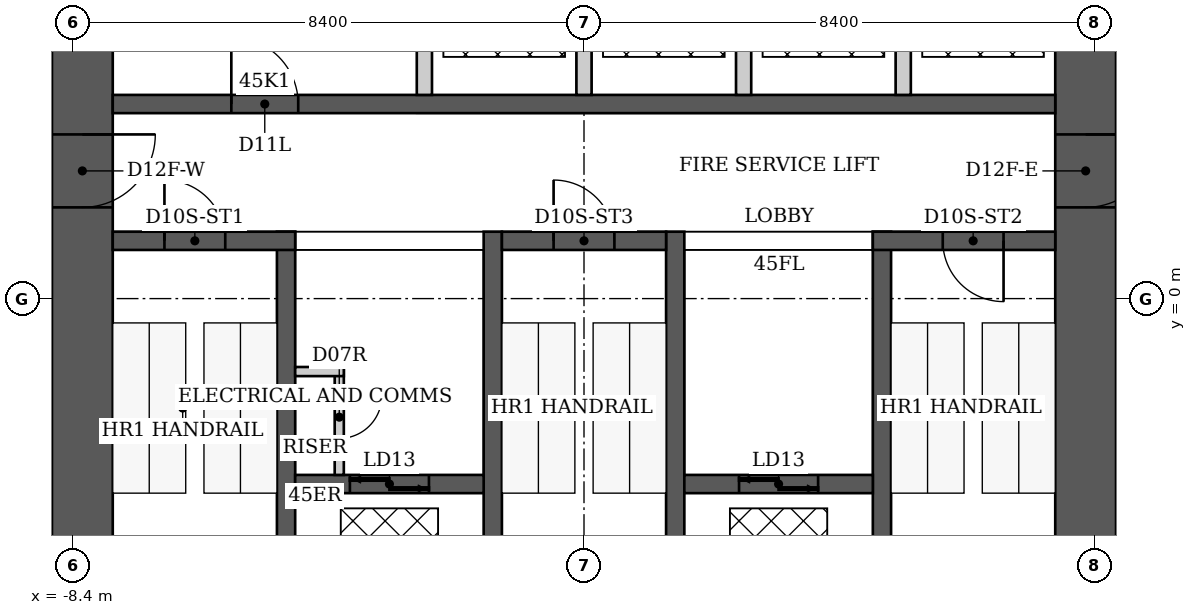
"""IFC4 building model, lengths in metres.
Left out: names, types, materials, properties, quantities, classifications, styles, units other than length and angle.
Written with IfcOpenShell. Run it as: python <this file> out.ifc"""

import sys

from ifc_helpers import new_model, si_unit, direction, frame, frame_2d, origin, place, context, subcontext, project, spatial, rectangle, extrude, element, fill, save


model = new_model("IFC4")
c1 = context("Model", 3, precision=1e-05, world=origin(), true_north=direction((0.0, 1.0)))
c2 = subcontext(c1, "Body", "Model", "MODEL_VIEW")
j1 = project(units=[si_unit("LENGTHUNIT", "METRE"), si_unit("PLANEANGLEUNIT", "RADIAN")], contexts=[c1])
p1 = place(None, origin())
s1 = spatial("IfcSite", under=j1, at=p1, CompositionType="ELEMENT")
p2 = place(p1, origin())
s2 = spatial("IfcBuilding", under=s1, at=p2, CompositionType="ELEMENT")
p3 = place(p2, frame((0.0, 0.0, 183.2)))
s3 = spatial("IfcBuildingStorey", under=s2, at=p3, CompositionType="ELEMENT", Elevation=183.2)
p4 = place(p3, frame((-8.25, -6.1, 0.0), z_axis=(0.0, 0.0, 1.0), x_axis=(0.0, 1.0, 0.0)))
e1 = element("IfcWall", 1, at=p4, inside=s3, PredefinedType="SHEAR", context=c2, shape_type="SweptSolid", body=[
    extrude(rectangle(XDim=12.2, YDim=1.0, at=frame_2d((6.1, 0.0))), origin(), (0.0, 0.0, 1.0), 3.8),
])
p5 = place(p4, frame((7.6, 0.0, 0.0)))
e2 = element("IfcOpeningElement", 2, at=p5, cuts=e1, PredefinedType="OPENING", context=c2, shape_type="SweptSolid", body=[
    extrude(rectangle(XDim=1.2, YDim=2.2, at=frame_2d((0.6, 1.1))), frame((0.0, 0.5, 0.0), z_axis=(0.0, -1.0, 0.0), x_axis=(1.0, 0.0, 0.0)), (0.0, 0.0, 1.0), 1.0),
])
p6 = place(p3, frame((8.25, -6.1, 0.0), z_axis=(0.0, 0.0, 1.0), x_axis=(0.0, 1.0, 0.0)))
e3 = element("IfcWall", 3, at=p6, inside=s3, PredefinedType="SHEAR", context=c2, shape_type="SweptSolid", body=[
    extrude(rectangle(XDim=12.2, YDim=1.0, at=frame_2d((6.1, 0.0))), origin(), (0.0, 0.0, 1.0), 3.8),
])
p7 = place(p6, frame((7.6, 0.0, 0.0)))
e4 = element("IfcOpeningElement", 4, at=p7, cuts=e3, PredefinedType="OPENING", context=c2, shape_type="SweptSolid", body=[
    extrude(rectangle(XDim=1.2, YDim=2.2, at=frame_2d((0.6, 1.1))), frame((0.0, 0.5, 0.0), z_axis=(0.0, -1.0, 0.0), x_axis=(1.0, 0.0, 0.0)), (0.0, 0.0, 1.0), 1.0),
])
for number, where, z_axis, x_axis in (
    (5, (-4.9, -6.1, 0.0), (0.0, 0.0, 1.0), (0.0, 1.0, 0.0)),
    (6, (-1.5, -6.1, 0.0), (0.0, 0.0, 1.0), (0.0, 1.0, 0.0)),
    (7, (1.5, -6.1, 0.0), (0.0, 0.0, 1.0), (0.0, 1.0, 0.0)),
    (8, (4.9, -6.1, 0.0), (0.0, 0.0, 1.0), (0.0, 1.0, 0.0)),
):
    element("IfcWall", number, at=place(p3, frame(where, z_axis=z_axis, x_axis=x_axis)), inside=s3, PredefinedType="SHEAR", context=c2, shape_type="SweptSolid", body=[
        extrude(rectangle(XDim=7.2, YDim=0.3, at=frame_2d((3.6, 0.0))), origin(), (0.0, 0.0, 1.0), 3.8),
    ])
p8 = place(p3, frame((-7.75, 0.95, 0.0), z_axis=(0.0, 0.0, 1.0), x_axis=(1.0, 0.0, 0.0)))
e9 = element("IfcWall", 9, at=p8, inside=s3, PredefinedType="SHEAR", context=c2, shape_type="SweptSolid", body=[
    extrude(rectangle(XDim=3.0, YDim=0.3, at=frame_2d((1.5, 0.0))), origin(), (0.0, 0.0, 1.0), 3.8),
])
p9 = place(p8, frame((0.85, 0.0, 0.0)))
e10 = element("IfcOpeningElement", 10, at=p9, cuts=e9, PredefinedType="OPENING", context=c2, shape_type="SweptSolid", body=[
    extrude(rectangle(XDim=1.0, YDim=2.2, at=frame_2d((0.5, 1.1))), frame((0.0, 0.15, 0.0), z_axis=(0.0, -1.0, 0.0), x_axis=(1.0, 0.0, 0.0)), (0.0, 0.0, 1.0), 0.3),
])
p10 = place(p3, frame((-1.35, 0.95, 0.0), z_axis=(0.0, 0.0, 1.0), x_axis=(1.0, 0.0, 0.0)))
e11 = element("IfcWall", 11, at=p10, inside=s3, PredefinedType="SHEAR", context=c2, shape_type="SweptSolid", body=[
    extrude(rectangle(XDim=2.7, YDim=0.3, at=frame_2d((1.35, 0.0))), origin(), (0.0, 0.0, 1.0), 3.8),
])
p11 = place(p10, frame((0.85, 0.0, 0.0)))
e12 = element("IfcOpeningElement", 12, at=p11, cuts=e11, PredefinedType="OPENING", context=c2, shape_type="SweptSolid", body=[
    extrude(rectangle(XDim=1.0, YDim=2.2, at=frame_2d((0.5, 1.1))), frame((0.0, 0.15, 0.0), z_axis=(0.0, -1.0, 0.0), x_axis=(1.0, 0.0, 0.0)), (0.0, 0.0, 1.0), 0.3),
])
p12 = place(p3, frame((4.75, 0.95, 0.0), z_axis=(0.0, 0.0, 1.0), x_axis=(1.0, 0.0, 0.0)))
e13 = element("IfcWall", 13, at=p12, inside=s3, PredefinedType="SHEAR", context=c2, shape_type="SweptSolid", body=[
    extrude(rectangle(XDim=3.0, YDim=0.3, at=frame_2d((1.5, 0.0))), origin(), (0.0, 0.0, 1.0), 3.8),
])
p13 = place(p12, frame((1.15, 0.0, 0.0)))
e14 = element("IfcOpeningElement", 14, at=p13, cuts=e13, PredefinedType="OPENING", context=c2, shape_type="SweptSolid", body=[
    extrude(rectangle(XDim=1.0, YDim=2.2, at=frame_2d((0.5, 1.1))), frame((0.0, 0.15, 0.0), z_axis=(0.0, -1.0, 0.0), x_axis=(1.0, 0.0, 0.0)), (0.0, 0.0, 1.0), 0.3),
])
p14 = place(p3, frame((-4.75, -3.05, 0.0), z_axis=(0.0, 0.0, 1.0), x_axis=(1.0, 0.0, 0.0)))
e15 = element("IfcWall", 15, at=p14, inside=s3, PredefinedType="SHEAR", context=c2, shape_type="SweptSolid", body=[
    extrude(rectangle(XDim=3.1, YDim=0.3, at=frame_2d((1.55, 0.0))), origin(), (0.0, 0.0, 1.0), 3.8),
])
p15 = place(p14, frame((0.9, 0.0, 0.0)))
e16 = element("IfcOpeningElement", 16, at=p15, cuts=e15, PredefinedType="OPENING", context=c2, shape_type="SweptSolid", body=[
    extrude(rectangle(XDim=1.3, YDim=2.1, at=frame_2d((0.65, 1.05))), frame((0.0, 0.15, 0.0), z_axis=(0.0, -1.0, 0.0), x_axis=(1.0, 0.0, 0.0)), (0.0, 0.0, 1.0), 0.3),
])
p16 = place(p3, frame((1.65, -3.05, 0.0), z_axis=(0.0, 0.0, 1.0), x_axis=(1.0, 0.0, 0.0)))
e17 = element("IfcWall", 17, at=p16, inside=s3, PredefinedType="SHEAR", context=c2, shape_type="SweptSolid", body=[
    extrude(rectangle(XDim=3.1, YDim=0.3, at=frame_2d((1.55, 0.0))), origin(), (0.0, 0.0, 1.0), 3.8),
])
p17 = place(p16, frame((0.9, 0.0, 0.0)))
e18 = element("IfcOpeningElement", 18, at=p17, cuts=e17, PredefinedType="OPENING", context=c2, shape_type="SweptSolid", body=[
    extrude(rectangle(XDim=1.3, YDim=2.1, at=frame_2d((0.65, 1.05))), frame((0.0, 0.15, 0.0), z_axis=(0.0, -1.0, 0.0), x_axis=(1.0, 0.0, 0.0)), (0.0, 0.0, 1.0), 0.3),
])
p18 = place(p3, frame((-7.75, 3.2, 0.0), z_axis=(0.0, 0.0, 1.0), x_axis=(1.0, 0.0, 0.0)))
e19 = element("IfcWall", 19, at=p18, inside=s3, PredefinedType="SHEAR", context=c2, shape_type="SweptSolid", body=[
    extrude(rectangle(XDim=15.5, YDim=0.3, at=frame_2d((7.75, 0.0))), origin(), (0.0, 0.0, 1.0), 3.8),
])
p19 = place(p18, frame((1.95, 0.0, 0.0)))
e20 = element("IfcOpeningElement", 20, at=p19, cuts=e19, PredefinedType="OPENING", context=c2, shape_type="SweptSolid", body=[
    extrude(rectangle(XDim=1.1, YDim=2.2, at=frame_2d((0.55, 1.1))), frame((0.0, 0.15, 0.0), z_axis=(0.0, -1.0, 0.0), x_axis=(1.0, 0.0, 0.0)), (0.0, 0.0, 1.0), 0.3),
])
for number, where, z_axis, x_axis in (
    (21, (-2.625, 3.35, 0.0), (0.0, 0.0, 1.0), (0.0, 1.0, 0.0)),
    (22, (0.0, 3.35, 0.0), (0.0, 0.0, 1.0), (0.0, 1.0, 0.0)),
    (23, (2.625, 3.35, 0.0), (0.0, 0.0, 1.0), (0.0, 1.0, 0.0)),
    (24, (5.25, 3.35, 0.0), (0.0, 0.0, 1.0), (0.0, 1.0, 0.0)),
):
    element("IfcWall", number, at=place(p3, frame(where, z_axis=z_axis, x_axis=x_axis)), inside=s3, PredefinedType="PARTITIONING", context=c2, shape_type="SweptSolid", body=[
        extrude(rectangle(XDim=2.75, YDim=0.25, at=frame_2d((1.375, 0.0))), origin(), (0.0, 0.0, 1.0), 3.8),
    ])
p20 = place(p3, frame((-4.025, -2.9, 0.0), z_axis=(0.0, 0.0, 1.0), x_axis=(0.0, 1.0, 0.0)))
e25 = element("IfcWall", 25, at=p20, inside=s3, PredefinedType="PARTITIONING", context=c2, shape_type="SweptSolid", body=[
    extrude(rectangle(XDim=1.775, YDim=0.15, at=frame_2d((0.887, 0.0))), origin(), (0.0, 0.0, 1.0), 3.64),
])
p21 = place(p20, frame((0.6, 0.0, 0.0)))
e26 = element("IfcOpeningElement", 26, at=p21, cuts=e25, PredefinedType="OPENING", context=c2, shape_type="SweptSolid", body=[
    extrude(rectangle(XDim=0.7, YDim=2.1, at=frame_2d((0.35, 1.05))), frame((0.0, 0.075, 0.0), z_axis=(0.0, -1.0, 0.0), x_axis=(1.0, 0.0, 0.0)), (0.0, 0.0, 1.0), 0.15),
])
p22 = place(p3, frame((-4.75, -1.2, 0.0), z_axis=(0.0, 0.0, 1.0), x_axis=(1.0, 0.0, 0.0)))
e27 = element("IfcWall", 27, at=p22, inside=s3, PredefinedType="PARTITIONING", context=c2, shape_type="SweptSolid", body=[
    extrude(rectangle(XDim=0.8, YDim=0.15, at=frame_2d((0.4, 0.0))), origin(), (0.0, 0.0, 1.0), 3.64),
])
p23 = place(p9, origin())
e28 = element("IfcDoor", 28, at=p23, inside=s3, OperationType="SINGLE_SWING_LEFT", PredefinedType="DOOR", context=c2, shape_type="SweptSolid", body=[
    extrude(rectangle(XDim=1.0, YDim=2.2, at=frame_2d((0.5, 1.1))), frame((0.0, 0.025, 0.0), z_axis=(0.0, -1.0, 0.0), x_axis=(1.0, 0.0, 0.0)), (0.0, 0.0, 1.0), 0.05),
])
fill(e10, e28)
p24 = place(p11, origin())
e29 = element("IfcDoor", 29, at=p24, inside=s3, OperationType="SINGLE_SWING_LEFT", PredefinedType="DOOR", context=c2, shape_type="SweptSolid", body=[
    extrude(rectangle(XDim=1.0, YDim=2.2, at=frame_2d((0.5, 1.1))), frame((0.0, 0.025, 0.0), z_axis=(0.0, -1.0, 0.0), x_axis=(1.0, 0.0, 0.0)), (0.0, 0.0, 1.0), 0.05),
])
fill(e12, e29)
p25 = place(p13, origin())
e30 = element("IfcDoor", 30, at=p25, inside=s3, OperationType="SINGLE_SWING_RIGHT", PredefinedType="DOOR", context=c2, shape_type="SweptSolid", body=[
    extrude(rectangle(XDim=1.0, YDim=2.2, at=frame_2d((0.5, 1.1))), frame((0.0, 0.025, 0.0), z_axis=(0.0, -1.0, 0.0), x_axis=(1.0, 0.0, 0.0)), (0.0, 0.0, 1.0), 0.05),
])
fill(e14, e30)
p26 = place(p5, origin())
e31 = element("IfcDoor", 31, at=p26, inside=s3, OperationType="SINGLE_SWING_RIGHT", PredefinedType="DOOR", context=c2, shape_type="SweptSolid", body=[
    extrude(rectangle(XDim=1.2, YDim=2.2, at=frame_2d((0.6, 1.1))), frame((0.0, 0.025, 0.0), z_axis=(0.0, -1.0, 0.0), x_axis=(1.0, 0.0, 0.0)), (0.0, 0.0, 1.0), 0.05),
])
fill(e2, e31)
p27 = place(p7, origin())
e32 = element("IfcDoor", 32, at=p27, inside=s3, OperationType="SINGLE_SWING_RIGHT", PredefinedType="DOOR", context=c2, shape_type="SweptSolid", body=[
    extrude(rectangle(XDim=1.2, YDim=2.2, at=frame_2d((0.6, 1.1))), frame((0.0, 0.025, 0.0), z_axis=(0.0, -1.0, 0.0), x_axis=(1.0, 0.0, 0.0)), (0.0, 0.0, 1.0), 0.05),
])
fill(e4, e32)
p28 = place(p21, origin())
e33 = element("IfcDoor", 33, at=p28, inside=s3, OperationType="SINGLE_SWING_RIGHT", PredefinedType="DOOR", context=c2, shape_type="SweptSolid", body=[
    extrude(rectangle(XDim=0.7, YDim=2.1, at=frame_2d((0.35, 1.05))), frame((0.0, 0.025, 0.0), z_axis=(0.0, -1.0, 0.0), x_axis=(1.0, 0.0, 0.0)), (0.0, 0.0, 1.0), 0.05),
])
fill(e26, e33)
p29 = place(p19, origin())
e34 = element("IfcDoor", 34, at=p29, inside=s3, OperationType="SINGLE_SWING_LEFT", PredefinedType="DOOR", context=c2, shape_type="SweptSolid", body=[
    extrude(rectangle(XDim=1.1, YDim=2.2, at=frame_2d((0.55, 1.1))), frame((0.0, 0.025, 0.0), z_axis=(0.0, -1.0, 0.0), x_axis=(1.0, 0.0, 0.0)), (0.0, 0.0, 1.0), 0.05),
])
fill(e20, e34)
p30 = place(p15, origin())
e35 = element("IfcDoor", 35, at=p30, inside=s3, OperationType="DOUBLE_DOOR_SLIDING", PredefinedType="DOOR", context=c2, shape_type="SweptSolid", body=[
    extrude(rectangle(XDim=1.3, YDim=2.1, at=frame_2d((0.65, 1.05))), frame((0.0, 0.025, 0.0), z_axis=(0.0, -1.0, 0.0), x_axis=(1.0, 0.0, 0.0)), (0.0, 0.0, 1.0), 0.05),
])
fill(e16, e35)
p31 = place(p17, origin())
e36 = element("IfcDoor", 36, at=p31, inside=s3, OperationType="DOUBLE_DOOR_SLIDING", PredefinedType="DOOR", context=c2, shape_type="SweptSolid", body=[
    extrude(rectangle(XDim=1.3, YDim=2.1, at=frame_2d((0.65, 1.05))), frame((0.0, 0.025, 0.0), z_axis=(0.0, -1.0, 0.0), x_axis=(1.0, 0.0, 0.0)), (0.0, 0.0, 1.0), 0.05),
])
fill(e18, e36)
save(model, sys.argv[1])
